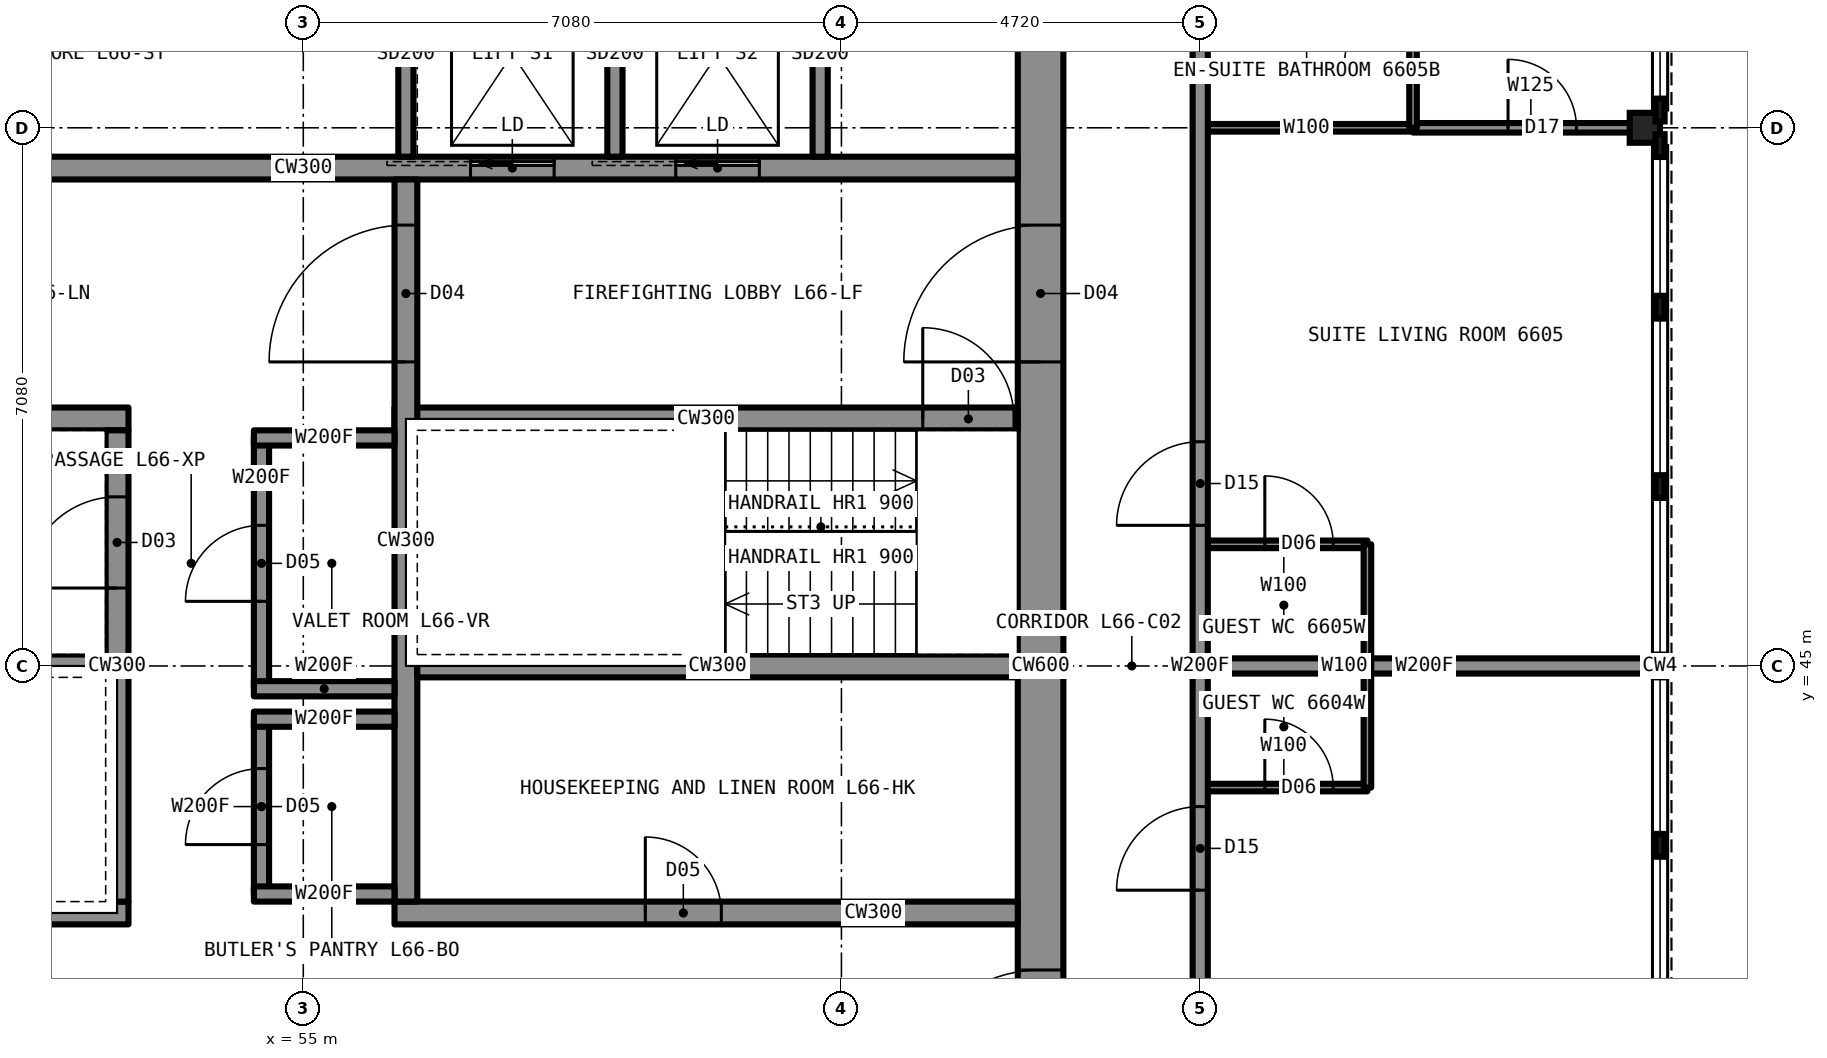
"""IFC4 building model, lengths in metres.
Left out: names, types, materials, properties, quantities, classifications, styles, units other than length and angle.
Written with IfcOpenShell. Run it as: python <this file> out.ifc"""

import sys

from ifc_helpers import new_model, si_unit, direction, frame, frame_2d, origin, origin_2d, place, context, subcontext, project, spatial, rectangle, i_section, extrude, element, fill, save


model = new_model("IFC4")
c1 = context("Model", 3, precision=1e-05, world=origin(), true_north=direction((0.0, 1.0)))
c2 = subcontext(c1, "Body", "Model", "MODEL_VIEW")
j1 = project(units=[si_unit("LENGTHUNIT", "METRE"), si_unit("PLANEANGLEUNIT", "RADIAN")], contexts=[c1])
p1 = place(None, origin())
s1 = spatial("IfcSite", under=j1, at=p1, CompositionType="ELEMENT")
p2 = place(p1, origin())
s2 = spatial("IfcBuilding", under=s1, at=p2, CompositionType="ELEMENT")
p3 = place(p2, frame((0.0, 0.0, 237.2)))
s3 = spatial("IfcBuildingStorey", under=s2, at=p3, CompositionType="ELEMENT", Elevation=237.2)
p4 = place(p3, frame((72.65, 52.08, 0.0), z_axis=(0.0, 0.0, 1.0), x_axis=(1.0, 0.0, 0.0)))
e1 = element("IfcColumn", 1, at=p4, inside=s3, PredefinedType="COLUMN", context=c2, shape_type="SweptSolid", body=[
    extrude(i_section(OverallWidth=0.399, OverallDepth=0.394, WebThickness=0.023, FlangeThickness=0.037, at=origin_2d()), origin(), (0.0, 0.0, 1.0), 3.5),
])
p5 = place(p3, frame((64.7, 35.6, 0.0), z_axis=(0.0, 0.0, 1.0), x_axis=(0.0, 1.0, 0.0)))
e2 = element("IfcWall", 2, at=p5, inside=s3, PredefinedType="SHEAR", context=c2, shape_type="SweptSolid", body=[
    extrude(rectangle(XDim=18.8, YDim=0.6, at=frame_2d((9.4, 0.0))), origin(), (0.0, 0.0, 1.0), 3.5),
])
p6 = place(p5, frame((13.4, 0.0, 0.0)))
e3 = element("IfcOpeningElement", 3, at=p6, cuts=e2, PredefinedType="OPENING", context=c2, shape_type="SweptSolid", body=[
    extrude(rectangle(XDim=1.8, YDim=2.2, at=frame_2d((0.9, 1.1))), frame((0.0, 0.31, 0.0), z_axis=(0.0, -1.0, 0.0), x_axis=(1.0, 0.0, 0.0)), (0.0, 0.0, 1.0), 0.62),
])
p7 = place(p5, frame((3.6, 0.0, 0.0)))
e4 = element("IfcOpeningElement", 4, at=p7, cuts=e2, PredefinedType="OPENING", context=c2, shape_type="SweptSolid", body=[
    extrude(rectangle(XDim=1.8, YDim=2.2, at=frame_2d((0.9, 1.1))), frame((0.0, 0.31, 0.0), z_axis=(0.0, -1.0, 0.0), x_axis=(1.0, 0.0, 0.0)), (0.0, 0.0, 1.0), 0.62),
])
p8 = place(p3, frame((45.6, 51.55, 0.0), z_axis=(0.0, 0.0, 1.0), x_axis=(1.0, 0.0, 0.0)))
e5 = element("IfcWall", 5, at=p8, inside=s3, PredefinedType="SHEAR", context=c2, shape_type="SweptSolid", body=[
    extrude(rectangle(XDim=18.8, YDim=0.3, at=frame_2d((9.4, 0.0))), origin(), (0.0, 0.0, 1.0), 3.5),
])
p9 = place(p8, frame((4.8, 0.0, 0.0)))
e6 = element("IfcOpeningElement", 6, at=p9, cuts=e5, PredefinedType="OPENING", context=c2, shape_type="SweptSolid", body=[
    extrude(rectangle(XDim=1.0, YDim=2.1, at=frame_2d((0.5, 1.05))), frame((0.0, 0.16, 0.0), z_axis=(0.0, -1.0, 0.0), x_axis=(1.0, 0.0, 0.0)), (0.0, 0.0, 1.0), 0.32),
])
p10 = place(p8, frame((11.6, 0.0, 0.0)))
e7 = element("IfcOpeningElement", 7, at=p10, cuts=e5, PredefinedType="OPENING", context=c2, shape_type="SweptSolid", body=[
    extrude(rectangle(XDim=1.1, YDim=2.2, at=frame_2d((0.55, 1.1))), frame((0.0, 0.16, 0.0), z_axis=(0.0, -1.0, 0.0), x_axis=(1.0, 0.0, 0.0)), (0.0, 0.0, 1.0), 0.32),
])
p11 = place(p8, frame((14.3, 0.0, 0.0)))
e8 = element("IfcOpeningElement", 8, at=p11, cuts=e5, PredefinedType="OPENING", context=c2, shape_type="SweptSolid", body=[
    extrude(rectangle(XDim=1.1, YDim=2.2, at=frame_2d((0.55, 1.1))), frame((0.0, 0.16, 0.0), z_axis=(0.0, -1.0, 0.0), x_axis=(1.0, 0.0, 0.0)), (0.0, 0.0, 1.0), 0.32),
])
p12 = place(p3, frame((45.6, 48.25, 0.0), z_axis=(0.0, 0.0, 1.0), x_axis=(1.0, 0.0, 0.0)))
e9 = element("IfcWall", 9, at=p12, inside=s3, PredefinedType="SHEAR", context=c2, shape_type="SweptSolid", body=[
    extrude(rectangle(XDim=7.1, YDim=0.3, at=frame_2d((3.55, 0.0))), origin(), (0.0, 0.0, 1.0), 3.5),
])
p13 = place(p3, frame((56.2, 48.25, 0.0), z_axis=(0.0, 0.0, 1.0), x_axis=(1.0, 0.0, 0.0)))
e10 = element("IfcWall", 10, at=p13, inside=s3, PredefinedType="SHEAR", context=c2, shape_type="SweptSolid", body=[
    extrude(rectangle(XDim=8.2, YDim=0.3, at=frame_2d((4.1, 0.0))), origin(), (0.0, 0.0, 1.0), 3.5),
])
p14 = place(p13, frame((6.95, 0.0, 0.0)))
e11 = element("IfcOpeningElement", 11, at=p14, cuts=e10, PredefinedType="OPENING", context=c2, shape_type="SweptSolid", body=[
    extrude(rectangle(XDim=1.2, YDim=2.2, at=frame_2d((0.6, 1.1))), frame((0.0, 0.16, 0.0), z_axis=(0.0, -1.0, 0.0), x_axis=(1.0, 0.0, 0.0)), (0.0, 0.0, 1.0), 0.32),
])
p15 = place(p3, frame((45.6, 41.75, 0.0), z_axis=(0.0, 0.0, 1.0), x_axis=(1.0, 0.0, 0.0)))
e12 = element("IfcWall", 12, at=p15, inside=s3, PredefinedType="SHEAR", context=c2, shape_type="SweptSolid", body=[
    extrude(rectangle(XDim=7.1, YDim=0.3, at=frame_2d((3.55, 0.0))), origin(), (0.0, 0.0, 1.0), 3.5),
])
p16 = place(p3, frame((56.2, 41.75, 0.0), z_axis=(0.0, 0.0, 1.0), x_axis=(1.0, 0.0, 0.0)))
e13 = element("IfcWall", 13, at=p16, inside=s3, PredefinedType="SHEAR", context=c2, shape_type="SweptSolid", body=[
    extrude(rectangle(XDim=8.2, YDim=0.3, at=frame_2d((4.1, 0.0))), origin(), (0.0, 0.0, 1.0), 3.5),
])
p17 = place(p16, frame((3.3, 0.0, 0.0)))
e14 = element("IfcOpeningElement", 14, at=p17, cuts=e13, PredefinedType="OPENING", context=c2, shape_type="SweptSolid", body=[
    extrude(rectangle(XDim=1.0, YDim=2.1, at=frame_2d((0.5, 1.05))), frame((0.0, 0.16, 0.0), z_axis=(0.0, -1.0, 0.0), x_axis=(1.0, 0.0, 0.0)), (0.0, 0.0, 1.0), 0.32),
])
p18 = place(p3, frame((52.55, 41.9, 0.0), z_axis=(0.0, 0.0, 1.0), x_axis=(0.0, 1.0, 0.0)))
e15 = element("IfcWall", 15, at=p18, inside=s3, PredefinedType="SHEAR", context=c2, shape_type="SweptSolid", body=[
    extrude(rectangle(XDim=6.2, YDim=0.3, at=frame_2d((3.1, 0.0))), origin(), (0.0, 0.0, 1.0), 3.5),
])
p19 = place(p18, frame((4.125, 0.0, 0.0)))
e16 = element("IfcOpeningElement", 16, at=p19, cuts=e15, PredefinedType="OPENING", context=c2, shape_type="SweptSolid", body=[
    extrude(rectangle(XDim=1.2, YDim=2.2, at=frame_2d((0.6, 1.1))), frame((0.0, 0.16, 0.0), z_axis=(0.0, -1.0, 0.0), x_axis=(1.0, 0.0, 0.0)), (0.0, 0.0, 1.0), 0.32),
])
p20 = place(p3, frame((56.35, 41.9, 0.0), z_axis=(0.0, 0.0, 1.0), x_axis=(0.0, 1.0, 0.0)))
e17 = element("IfcWall", 17, at=p20, inside=s3, PredefinedType="SHEAR", context=c2, shape_type="SweptSolid", body=[
    extrude(rectangle(XDim=9.5, YDim=0.3, at=frame_2d((4.75, 0.0))), origin(), (0.0, 0.0, 1.0), 3.5),
])
p21 = place(p20, frame((7.1, 0.0, 0.0)))
e18 = element("IfcOpeningElement", 18, at=p21, cuts=e17, PredefinedType="OPENING", context=c2, shape_type="SweptSolid", body=[
    extrude(rectangle(XDim=1.8, YDim=2.2, at=frame_2d((0.9, 1.1))), frame((0.0, 0.16, 0.0), z_axis=(0.0, -1.0, 0.0), x_axis=(1.0, 0.0, 0.0)), (0.0, 0.0, 1.0), 0.32),
])
p22 = place(p3, frame((45.6, 45.0, 0.0), z_axis=(0.0, 0.0, 1.0), x_axis=(1.0, 0.0, 0.0)))
e19 = element("IfcWall", 19, at=p22, inside=s3, PredefinedType="SHEAR", context=c2, shape_type="SweptSolid", body=[
    extrude(rectangle(XDim=6.8, YDim=0.3, at=frame_2d((3.4, 0.0))), origin(), (0.0, 0.0, 1.0), 3.5),
])
p23 = place(p3, frame((56.5, 45.0, 0.0), z_axis=(0.0, 0.0, 1.0), x_axis=(1.0, 0.0, 0.0)))
e20 = element("IfcWall", 20, at=p23, inside=s3, PredefinedType="SHEAR", context=c2, shape_type="SweptSolid", body=[
    extrude(rectangle(XDim=7.9, YDim=0.3, at=frame_2d((3.95, 0.0))), origin(), (0.0, 0.0, 1.0), 3.5),
])
p24 = place(p3, frame((66.8, 43.4, 0.0), z_axis=(0.0, 0.0, 1.0), x_axis=(1.0, 0.0, 0.0)))
e21 = element("IfcWall", 21, at=p24, inside=s3, PredefinedType="PARTITIONING", context=c2, shape_type="SweptSolid", body=[
    extrude(rectangle(XDim=2.2, YDim=0.1, at=frame_2d((1.1, 0.0))), origin(), (0.0, 0.0, 1.0), 3.33),
])
p25 = place(p24, frame((0.85, 0.0, 0.0)))
e22 = element("IfcOpeningElement", 22, at=p25, cuts=e21, PredefinedType="OPENING", context=c2, shape_type="SweptSolid", body=[
    extrude(rectangle(XDim=0.9, YDim=2.1, at=frame_2d((0.45, 1.05))), frame((0.0, 0.06, 0.0), z_axis=(0.0, -1.0, 0.0), x_axis=(1.0, 0.0, 0.0)), (0.0, 0.0, 1.0), 0.12),
])
p26 = place(p3, frame((66.8, 45.0, 0.0), z_axis=(0.0, 0.0, 1.0), x_axis=(1.0, 0.0, 0.0)))
e23 = element("IfcWall", 23, at=p26, inside=s3, PredefinedType="PARTITIONING", context=c2, shape_type="SweptSolid", body=[
    extrude(rectangle(XDim=5.9, YDim=0.2, at=frame_2d((2.95, 0.0))), origin(), (0.0, 0.0, 1.0), 2.797),
])
p27 = place(p3, frame((66.8, 46.6, 0.0), z_axis=(0.0, 0.0, 1.0), x_axis=(1.0, 0.0, 0.0)))
e24 = element("IfcWall", 24, at=p27, inside=s3, PredefinedType="PARTITIONING", context=c2, shape_type="SweptSolid", body=[
    extrude(rectangle(XDim=2.2, YDim=0.1, at=frame_2d((1.1, 0.0))), origin(), (0.0, 0.0, 1.0), 3.33),
])
p28 = place(p27, frame((0.85, 0.0, 0.0)))
e25 = element("IfcOpeningElement", 25, at=p28, cuts=e24, PredefinedType="OPENING", context=c2, shape_type="SweptSolid", body=[
    extrude(rectangle(XDim=0.9, YDim=2.1, at=frame_2d((0.45, 1.05))), frame((0.0, 0.06, 0.0), z_axis=(0.0, -1.0, 0.0), x_axis=(1.0, 0.0, 0.0)), (0.0, 0.0, 1.0), 0.12),
])
p29 = place(p3, frame((66.8, 52.08, 0.0), z_axis=(0.0, 0.0, 1.0), x_axis=(1.0, 0.0, 0.0)))
e26 = element("IfcWall", 26, at=p29, inside=s3, PredefinedType="PARTITIONING", context=c2, shape_type="SweptSolid", body=[
    extrude(rectangle(XDim=2.8, YDim=0.1, at=frame_2d((1.4, 0.0))), origin(), (0.0, 0.0, 1.0), 2.573),
])
p30 = place(p3, frame((69.6, 52.08, 0.0), z_axis=(0.0, 0.0, 1.0), x_axis=(1.0, 0.0, 0.0)))
e27 = element("IfcWall", 27, at=p30, inside=s3, PredefinedType="PARTITIONING", context=c2, shape_type="SweptSolid", body=[
    extrude(rectangle(XDim=3.1, YDim=0.125, at=frame_2d((1.55, 0.0))), origin(), (0.0, 0.0, 1.0), 2.573),
])
p31 = place(p30, frame((1.25, 0.0, 0.0)))
e28 = element("IfcOpeningElement", 28, at=p31, cuts=e27, PredefinedType="OPENING", context=c2, shape_type="SweptSolid", body=[
    extrude(rectangle(XDim=0.9, YDim=2.2, at=frame_2d((0.45, 1.1))), frame((0.0, 0.073, 0.0), z_axis=(0.0, -1.0, 0.0), x_axis=(1.0, 0.0, 0.0)), (0.0, 0.0, 1.0), 0.145),
])
p32 = place(p3, frame((66.8, 33.2, 0.0), z_axis=(0.0, 0.0, 1.0), x_axis=(0.0, 1.0, 0.0)))
e29 = element("IfcWall", 29, at=p32, inside=s3, PredefinedType="PARTITIONING", context=c2, shape_type="SweptSolid", body=[
    extrude(rectangle(XDim=23.6, YDim=0.2, at=frame_2d((11.8, 0.0))), origin(), (0.0, 0.0, 1.0), 3.33),
])
p33 = place(p32, frame((8.85, 0.0, 0.0)))
e30 = element("IfcOpeningElement", 30, at=p33, cuts=e29, PredefinedType="OPENING", context=c2, shape_type="SweptSolid", body=[
    extrude(rectangle(XDim=1.1, YDim=2.2, at=frame_2d((0.55, 1.1))), frame((0.0, 0.11, 0.0), z_axis=(0.0, -1.0, 0.0), x_axis=(1.0, 0.0, 0.0)), (0.0, 0.0, 1.0), 0.22),
])
p34 = place(p32, frame((13.65, 0.0, 0.0)))
e31 = element("IfcOpeningElement", 31, at=p34, cuts=e29, PredefinedType="OPENING", context=c2, shape_type="SweptSolid", body=[
    extrude(rectangle(XDim=1.1, YDim=2.2, at=frame_2d((0.55, 1.1))), frame((0.0, 0.11, 0.0), z_axis=(0.0, -1.0, 0.0), x_axis=(1.0, 0.0, 0.0)), (0.0, 0.0, 1.0), 0.22),
])
p35 = place(p3, frame((69.0, 43.4, 0.0), z_axis=(0.0, 0.0, 1.0), x_axis=(0.0, 1.0, 0.0)))
e32 = element("IfcWall", 32, at=p35, inside=s3, PredefinedType="PARTITIONING", context=c2, shape_type="SweptSolid", body=[
    extrude(rectangle(XDim=3.2, YDim=0.1, at=frame_2d((1.6, 0.0))), origin(), (0.0, 0.0, 1.0), 3.33),
])
p36 = place(p3, frame((69.6, 52.08, 0.0), z_axis=(0.0, 0.0, 1.0), x_axis=(0.0, 1.0, 0.0)))
e33 = element("IfcWall", 33, at=p36, inside=s3, PredefinedType="PARTITIONING", context=c2, shape_type="SweptSolid", body=[
    extrude(rectangle(XDim=2.6, YDim=0.1, at=frame_2d((1.3, 0.0))), origin(), (0.0, 0.0, 1.0), 3.33),
])
p37 = place(p36, frame((0.85, 0.0, 0.0)))
e34 = element("IfcOpeningElement", 34, at=p37, cuts=e33, PredefinedType="OPENING", context=c2, shape_type="SweptSolid", body=[
    extrude(rectangle(XDim=0.9, YDim=2.1, at=frame_2d((0.45, 1.05))), frame((0.0, 0.06, 0.0), z_axis=(0.0, -1.0, 0.0), x_axis=(1.0, 0.0, 0.0)), (0.0, 0.0, 1.0), 0.12),
])
p38 = place(p3, frame((54.45, 42.0, 0.0), z_axis=(0.0, 0.0, 1.0), x_axis=(0.0, 1.0, 0.0)))
e35 = element("IfcWall", 35, at=p38, inside=s3, PredefinedType="PARTITIONING", context=c2, shape_type="SweptSolid", body=[
    extrude(rectangle(XDim=4.5, YDim=0.2, at=frame_2d((2.25, 0.0))), origin(), (0.0, 0.0, 1.0), 3.33),
])
p39 = place(p38, frame((1.75, 0.0, 0.0)))
e36 = element("IfcOpeningElement", 36, at=p39, cuts=e35, PredefinedType="OPENING", context=c2, shape_type="SweptSolid", body=[
    extrude(rectangle(XDim=1.0, YDim=2.1, at=frame_2d((0.5, 1.05))), frame((0.0, 0.11, 0.0), z_axis=(0.0, -1.0, 0.0), x_axis=(1.0, 0.0, 0.0)), (0.0, 0.0, 1.0), 0.22),
])
for number, where, z_axis, x_axis in (
    (37, (54.35, 42.0, 0.0), (0.0, 0.0, 1.0), (1.0, 0.0, 0.0)),
    (38, (54.35, 46.5, 0.0), (0.0, 0.0, 1.0), (1.0, 0.0, 0.0)),
):
    element("IfcWall", number, at=place(p3, frame(where, z_axis=z_axis, x_axis=x_axis)), inside=s3, PredefinedType="PARTITIONING", context=c2, shape_type="SweptSolid", body=[
        extrude(rectangle(XDim=1.85, YDim=0.2, at=frame_2d((0.925, 0.0))), origin(), (0.0, 0.0, 1.0), 3.33),
    ])
for number, where, z_axis, x_axis in (
    (39, (59.1, 51.7, 0.0), (0.0, 0.0, 1.0), (0.0, 1.0, 0.0)),
    (40, (61.8, 51.7, 0.0), (0.0, 0.0, 1.0), (0.0, 1.0, 0.0)),
    (41, (56.35, 51.7, 0.0), (0.0, 0.0, 1.0), (0.0, 1.0, 0.0)),
):
    element("IfcWall", number, at=place(p3, frame(where, z_axis=z_axis, x_axis=x_axis)), inside=s3, PredefinedType="PARTITIONING", context=c2, shape_type="SweptSolid", body=[
        extrude(rectangle(XDim=2.7, YDim=0.2, at=frame_2d((1.35, 0.0))), origin(), (0.0, 0.0, 1.0), 3.33),
    ])
p40 = place(p33, origin())
e42 = element("IfcDoor", 42, at=p40, inside=s3, OperationType="SINGLE_SWING_LEFT", PredefinedType="DOOR", context=c2, shape_type="SweptSolid", body=[
    extrude(rectangle(XDim=1.1, YDim=2.2, at=frame_2d((0.55, 1.1))), frame((0.0, 0.025, 0.0), z_axis=(0.0, -1.0, 0.0), x_axis=(1.0, 0.0, 0.0)), (0.0, 0.0, 1.0), 0.05),
])
fill(e30, e42)
p41 = place(p25, origin())
e43 = element("IfcDoor", 43, at=p41, inside=s3, OperationType="SINGLE_SWING_LEFT", PredefinedType="DOOR", context=c2, shape_type="SweptSolid", body=[
    extrude(rectangle(XDim=0.9, YDim=2.1, at=frame_2d((0.45, 1.05))), frame((0.0, 0.025, 0.0), z_axis=(0.0, -1.0, 0.0), x_axis=(1.0, 0.0, 0.0)), (0.0, 0.0, 1.0), 0.05),
])
fill(e22, e43)
p42 = place(p34, origin())
e44 = element("IfcDoor", 44, at=p42, inside=s3, OperationType="SINGLE_SWING_LEFT", PredefinedType="DOOR", context=c2, shape_type="SweptSolid", body=[
    extrude(rectangle(XDim=1.1, YDim=2.2, at=frame_2d((0.55, 1.1))), frame((0.0, 0.025, 0.0), z_axis=(0.0, -1.0, 0.0), x_axis=(1.0, 0.0, 0.0)), (0.0, 0.0, 1.0), 0.05),
])
fill(e31, e44)
p43 = place(p37, origin())
e45 = element("IfcDoor", 45, at=p43, inside=s3, OperationType="SINGLE_SWING_RIGHT", PredefinedType="DOOR", context=c2, shape_type="SweptSolid", body=[
    extrude(rectangle(XDim=0.9, YDim=2.1, at=frame_2d((0.45, 1.05))), frame((0.0, 0.025, 0.0), z_axis=(0.0, -1.0, 0.0), x_axis=(1.0, 0.0, 0.0)), (0.0, 0.0, 1.0), 0.05),
])
fill(e34, e45)
p44 = place(p31, origin())
e46 = element("IfcDoor", 46, at=p44, inside=s3, OperationType="SINGLE_SWING_LEFT", PredefinedType="DOOR", context=c2, shape_type="SweptSolid", body=[
    extrude(rectangle(XDim=0.9, YDim=2.2, at=frame_2d((0.45, 1.1))), frame((0.0, 0.025, 0.0), z_axis=(0.0, -1.0, 0.0), x_axis=(1.0, 0.0, 0.0)), (0.0, 0.0, 1.0), 0.05),
])
fill(e28, e46)
p45 = place(p28, origin())
e47 = element("IfcDoor", 47, at=p45, inside=s3, OperationType="SINGLE_SWING_LEFT", PredefinedType="DOOR", context=c2, shape_type="SweptSolid", body=[
    extrude(rectangle(XDim=0.9, YDim=2.1, at=frame_2d((0.45, 1.05))), frame((0.0, 0.025, 0.0), z_axis=(0.0, -1.0, 0.0), x_axis=(1.0, 0.0, 0.0)), (0.0, 0.0, 1.0), 0.05),
])
fill(e25, e47)
p46 = place(p39, origin())
e48 = element("IfcDoor", 48, at=p46, inside=s3, OperationType="SINGLE_SWING_LEFT", PredefinedType="DOOR", context=c2, shape_type="SweptSolid", body=[
    extrude(rectangle(XDim=1.0, YDim=2.1, at=frame_2d((0.5, 1.05))), frame((0.0, 0.025, 0.0), z_axis=(0.0, -1.0, 0.0), x_axis=(1.0, 0.0, 0.0)), (0.0, 0.0, 1.0), 0.05),
])
fill(e36, e48)
p47 = place(p6, origin())
e49 = element("IfcDoor", 49, at=p47, inside=s3, OperationType="DOUBLE_DOOR_SINGLE_SWING", PredefinedType="DOOR", context=c2, shape_type="SweptSolid", body=[
    extrude(rectangle(XDim=1.8, YDim=2.2, at=frame_2d((0.9, 1.1))), frame((0.0, 0.025, 0.0), z_axis=(0.0, -1.0, 0.0), x_axis=(1.0, 0.0, 0.0)), (0.0, 0.0, 1.0), 0.05),
])
fill(e3, e49)
p48 = place(p7, origin())
e50 = element("IfcDoor", 50, at=p48, inside=s3, OperationType="DOUBLE_DOOR_SINGLE_SWING", PredefinedType="DOOR", context=c2, shape_type="SweptSolid", body=[
    extrude(rectangle(XDim=1.8, YDim=2.2, at=frame_2d((0.9, 1.1))), frame((0.0, 0.025, 0.0), z_axis=(0.0, -1.0, 0.0), x_axis=(1.0, 0.0, 0.0)), (0.0, 0.0, 1.0), 0.05),
])
fill(e4, e50)
p49 = place(p21, origin())
e51 = element("IfcDoor", 51, at=p49, inside=s3, OperationType="DOUBLE_DOOR_SINGLE_SWING", PredefinedType="DOOR", context=c2, shape_type="SweptSolid", body=[
    extrude(rectangle(XDim=1.8, YDim=2.2, at=frame_2d((0.9, 1.1))), frame((0.0, 0.025, 0.0), z_axis=(0.0, -1.0, 0.0), x_axis=(1.0, 0.0, 0.0)), (0.0, 0.0, 1.0), 0.05),
])
fill(e18, e51)
p50 = place(p19, origin())
e52 = element("IfcDoor", 52, at=p50, inside=s3, OperationType="SINGLE_SWING_LEFT", PredefinedType="DOOR", context=c2, shape_type="SweptSolid", body=[
    extrude(rectangle(XDim=1.2, YDim=2.2, at=frame_2d((0.6, 1.1))), frame((0.0, 0.025, 0.0), z_axis=(0.0, -1.0, 0.0), x_axis=(1.0, 0.0, 0.0)), (0.0, 0.0, 1.0), 0.05),
])
fill(e16, e52)
p51 = place(p14, origin())
e53 = element("IfcDoor", 53, at=p51, inside=s3, OperationType="SINGLE_SWING_LEFT", PredefinedType="DOOR", context=c2, shape_type="SweptSolid", body=[
    extrude(rectangle(XDim=1.2, YDim=2.2, at=frame_2d((0.6, 1.1))), frame((0.0, 0.025, 0.0), z_axis=(0.0, -1.0, 0.0), x_axis=(1.0, 0.0, 0.0)), (0.0, 0.0, 1.0), 0.05),
])
fill(e11, e53)
p52 = place(p17, origin())
e54 = element("IfcDoor", 54, at=p52, inside=s3, OperationType="SINGLE_SWING_LEFT", PredefinedType="DOOR", context=c2, shape_type="SweptSolid", body=[
    extrude(rectangle(XDim=1.0, YDim=2.1, at=frame_2d((0.5, 1.05))), frame((0.0, 0.025, 0.0), z_axis=(0.0, -1.0, 0.0), x_axis=(1.0, 0.0, 0.0)), (0.0, 0.0, 1.0), 0.05),
])
fill(e14, e54)
p53 = place(p10, origin())
e55 = element("IfcDoor", 55, at=p53, inside=s3, OperationType="SLIDING_TO_LEFT", PredefinedType="DOOR", context=c2, shape_type="SweptSolid", body=[
    extrude(rectangle(XDim=1.1, YDim=2.2, at=frame_2d((0.55, 1.1))), frame((0.0, 0.025, 0.0), z_axis=(0.0, -1.0, 0.0), x_axis=(1.0, 0.0, 0.0)), (0.0, 0.0, 1.0), 0.05),
])
fill(e7, e55)
p54 = place(p11, origin())
e56 = element("IfcDoor", 56, at=p54, inside=s3, OperationType="SLIDING_TO_LEFT", PredefinedType="DOOR", context=c2, shape_type="SweptSolid", body=[
    extrude(rectangle(XDim=1.1, YDim=2.2, at=frame_2d((0.55, 1.1))), frame((0.0, 0.025, 0.0), z_axis=(0.0, -1.0, 0.0), x_axis=(1.0, 0.0, 0.0)), (0.0, 0.0, 1.0), 0.05),
])
fill(e8, e56)
save(model, sys.argv[1])
